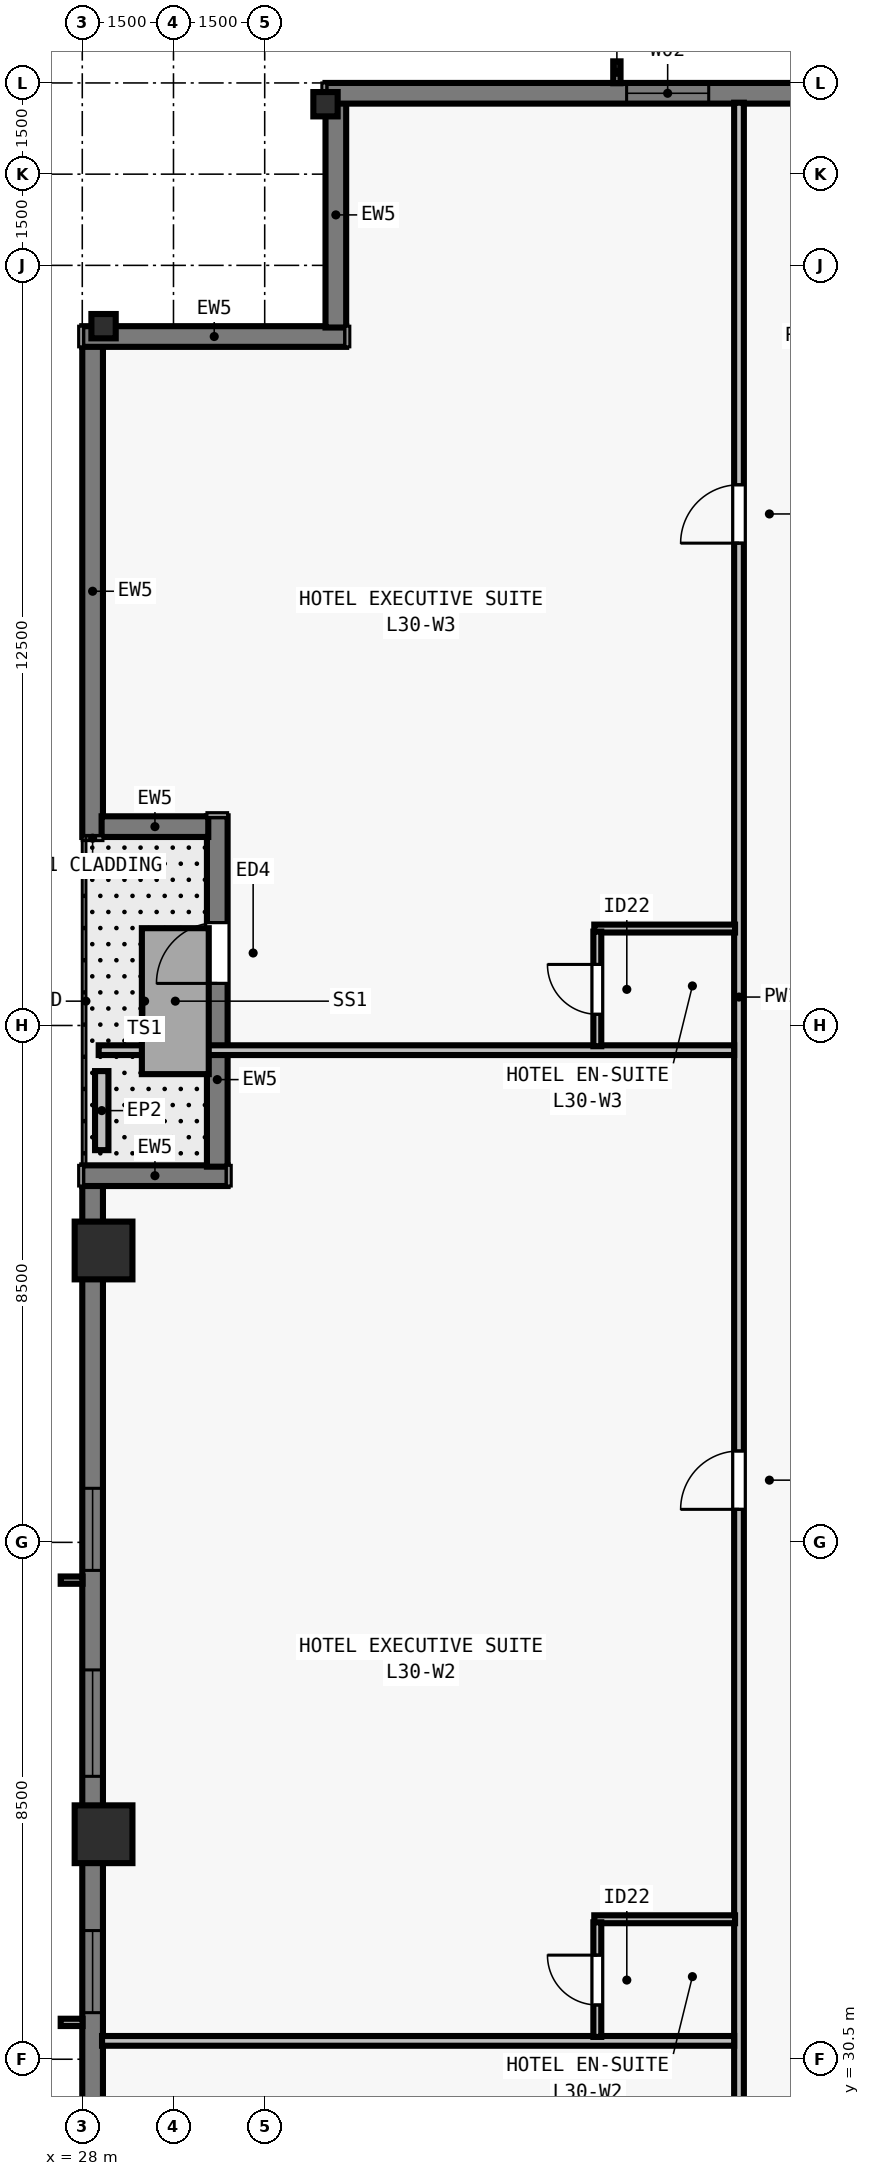
"""IFC4 building model, lengths in metres.
Left out: names, types, materials, properties, quantities, classifications, styles, units other than length and angle.
Written with IfcOpenShell. Run it as: python <this file> out.ifc"""

import sys

from ifc_helpers import new_model, si_unit, direction, frame, frame_2d, origin, origin_2d, place, context, subcontext, project, spatial, rectangle, i_section, extrude, element, fill, save


model = new_model("IFC4")
c1 = context("Model", 3, precision=1e-05, world=origin(), true_north=direction((0.0, 1.0)))
c2 = subcontext(c1, "Body", "Model", "MODEL_VIEW")
j1 = project(units=[si_unit("LENGTHUNIT", "METRE"), si_unit("PLANEANGLEUNIT", "RADIAN")], contexts=[c1])
p1 = place(None, origin())
s1 = spatial("IfcSite", under=j1, at=p1, CompositionType="ELEMENT")
p2 = place(p1, origin())
s2 = spatial("IfcBuilding", under=s1, at=p2, CompositionType="ELEMENT")
p3 = place(p2, frame((0.0, 0.0, 113.0)))
s3 = spatial("IfcBuildingStorey", under=s2, at=p3, CompositionType="ELEMENT", Elevation=113.0)
for number, where, z_axis, x_axis in (
    (1, (32.0, 62.65, 0.0), (0.0, 0.0, 1.0), (1.0, 0.0, 0.0)),
    (2, (28.35, 59.0, 0.0), (0.0, 0.0, 1.0), (0.0, 1.0, 0.0)),
):
    element("IfcColumn", number, at=place(p3, frame(where, z_axis=z_axis, x_axis=x_axis)), inside=s3, PredefinedType="COLUMN", context=c2, shape_type="SweptSolid", body=[
        extrude(i_section(OverallWidth=0.4, OverallDepth=0.4, WebThickness=0.022, FlangeThickness=0.036, at=origin_2d()), origin(), (0.0, 0.0, 1.0), 3.5),
    ])
for number, where, z_axis, x_axis in (
    (3, (28.35, 43.8, 0.0), (0.0, 0.0, 1.0), (0.0, 1.0, 0.0)),
    (4, (28.35, 34.2, 0.0), (0.0, 0.0, 1.0), (0.0, 1.0, 0.0)),
):
    element("IfcColumn", number, at=place(p3, frame(where, z_axis=z_axis, x_axis=x_axis)), inside=s3, PredefinedType="COLUMN", context=c2, shape_type="SweptSolid", body=[
        extrude(rectangle(XDim=0.95, YDim=0.95, at=origin_2d()), origin(), (0.0, 0.0, 1.0), 3.5),
    ])
p4 = place(p3, frame((28.17, 50.6, 0.0), z_axis=(0.0, 0.0, 1.0), x_axis=(0.0, 1.0, 0.0)))
e5 = element("IfcWall", 5, at=p4, inside=s3, PredefinedType="SOLIDWALL", context=c2, shape_type="SweptSolid", body=[
    extrude(rectangle(XDim=8.082, YDim=0.34, at=frame_2d((4.041, 0.0))), origin(), (0.0, 0.0, 1.0), 3.28),
])
p5 = place(p3, frame((28.0, 58.83, 0.0), z_axis=(0.0, 0.0, 1.0), x_axis=(1.0, 0.0, 0.0)))
e6 = element("IfcWall", 6, at=p5, inside=s3, PredefinedType="SOLIDWALL", context=c2, shape_type="SweptSolid", body=[
    extrude(rectangle(XDim=4.34, YDim=0.34, at=frame_2d((2.17, 0.0))), origin(), (0.0, 0.0, 1.0), 3.28),
])
p6 = place(p3, frame((32.17, 58.978, 0.0), z_axis=(0.0, 0.0, 1.0), x_axis=(0.0, 1.0, 0.0)))
e7 = element("IfcWall", 7, at=p6, inside=s3, PredefinedType="SOLIDWALL", context=c2, shape_type="SweptSolid", body=[
    extrude(rectangle(XDim=3.704, YDim=0.34, at=frame_2d((1.852, 0.0))), origin(), (0.0, 0.0, 1.0), 3.28),
])
p7 = place(p3, frame((32.0, 62.83, 0.0), z_axis=(0.0, 0.0, 1.0), x_axis=(1.0, 0.0, 0.0)))
e8 = element("IfcWall", 8, at=p7, inside=s3, PredefinedType="SOLIDWALL", context=c2, shape_type="SweptSolid", body=[
    extrude(rectangle(XDim=39.682, YDim=0.34, at=frame_2d((19.841, 0.0))), origin(), (0.0, 0.0, 1.0), 3.28),
])
p8 = place(p7, frame((4.952, 0.0, 0.8)))
e9 = element("IfcOpeningElement", 9, at=p8, cuts=e8, PredefinedType="OPENING", context=c2, shape_type="SweptSolid", body=[
    extrude(rectangle(XDim=1.35, YDim=1.66, at=frame_2d((0.675, 0.83))), frame((0.0, 0.18, 0.0), z_axis=(0.0, -1.0, 0.0), x_axis=(1.0, 0.0, 0.0)), (0.0, 0.0, 1.0), 0.36),
])
p9 = place(p7, frame((9.555, 0.0, 0.8)))
e10 = element("IfcOpeningElement", 10, at=p9, cuts=e8, PredefinedType="OPENING", context=c2, shape_type="SweptSolid", body=[
    extrude(rectangle(XDim=1.75, YDim=1.66, at=frame_2d((0.875, 0.83))), frame((0.0, 0.18, 0.0), z_axis=(0.0, -1.0, 0.0), x_axis=(1.0, 0.0, 0.0)), (0.0, 0.0, 1.0), 0.36),
])
p10 = place(p7, frame((12.059, 0.0, 0.8)))
e11 = element("IfcOpeningElement", 11, at=p10, cuts=e8, PredefinedType="OPENING", context=c2, shape_type="SweptSolid", body=[
    extrude(rectangle(XDim=1.35, YDim=1.66, at=frame_2d((0.675, 0.83))), frame((0.0, 0.18, 0.0), z_axis=(0.0, -1.0, 0.0), x_axis=(1.0, 0.0, 0.0)), (0.0, 0.0, 1.0), 0.36),
])
p11 = place(p7, frame((19.166, 0.0, 0.8)))
e12 = element("IfcOpeningElement", 12, at=p11, cuts=e8, PredefinedType="OPENING", context=c2, shape_type="SweptSolid", body=[
    extrude(rectangle(XDim=1.35, YDim=1.66, at=frame_2d((0.675, 0.83))), frame((0.0, 0.18, 0.0), z_axis=(0.0, -1.0, 0.0), x_axis=(1.0, 0.0, 0.0)), (0.0, 0.0, 1.0), 0.36),
])
p12 = place(p7, frame((21.27, 0.0, 0.8)))
e13 = element("IfcOpeningElement", 13, at=p12, cuts=e8, PredefinedType="OPENING", context=c2, shape_type="SweptSolid", body=[
    extrude(rectangle(XDim=1.75, YDim=1.66, at=frame_2d((0.875, 0.83))), frame((0.0, 0.18, 0.0), z_axis=(0.0, -1.0, 0.0), x_axis=(1.0, 0.0, 0.0)), (0.0, 0.0, 1.0), 0.36),
])
p13 = place(p7, frame((26.273, 0.0, 0.8)))
e14 = element("IfcOpeningElement", 14, at=p13, cuts=e8, PredefinedType="OPENING", context=c2, shape_type="SweptSolid", body=[
    extrude(rectangle(XDim=1.35, YDim=1.66, at=frame_2d((0.675, 0.83))), frame((0.0, 0.18, 0.0), z_axis=(0.0, -1.0, 0.0), x_axis=(1.0, 0.0, 0.0)), (0.0, 0.0, 1.0), 0.36),
])
p14 = place(p7, frame((28.777, 0.0, 0.8)))
e15 = element("IfcOpeningElement", 15, at=p14, cuts=e8, PredefinedType="OPENING", context=c2, shape_type="SweptSolid", body=[
    extrude(rectangle(XDim=1.75, YDim=1.66, at=frame_2d((0.875, 0.83))), frame((0.0, 0.18, 0.0), z_axis=(0.0, -1.0, 0.0), x_axis=(1.0, 0.0, 0.0)), (0.0, 0.0, 1.0), 0.36),
])
p15 = place(p7, frame((33.83, 0.0, 0.8)))
e16 = element("IfcOpeningElement", 16, at=p15, cuts=e8, PredefinedType="OPENING", context=c2, shape_type="SweptSolid", body=[
    extrude(rectangle(XDim=1.35, YDim=1.66, at=frame_2d((0.675, 0.83))), frame((0.0, 0.18, 0.0), z_axis=(0.0, -1.0, 0.0), x_axis=(1.0, 0.0, 0.0)), (0.0, 0.0, 1.0), 0.36),
])
p16 = place(p3, frame((28.17, 19.0, 0.0), z_axis=(0.0, 0.0, 1.0), x_axis=(0.0, 1.0, 0.0)))
e17 = element("IfcWall", 17, at=p16, inside=s3, PredefinedType="SOLIDWALL", context=c2, shape_type="SweptSolid", body=[
    extrude(rectangle(XDim=25.882, YDim=0.34, at=frame_2d((12.941, 0.0))), origin(), (0.0, 0.0, 1.0), 3.28),
])
p17 = place(p16, frame((4.993, 0.0, 0.8)))
e18 = element("IfcOpeningElement", 18, at=p17, cuts=e17, PredefinedType="OPENING", context=c2, shape_type="SweptSolid", body=[
    extrude(rectangle(XDim=1.35, YDim=1.66, at=frame_2d((0.675, 0.83))), frame((0.0, 0.18, 0.0), z_axis=(0.0, -1.0, 0.0), x_axis=(1.0, 0.0, 0.0)), (0.0, 0.0, 1.0), 0.36),
])
p18 = place(p16, frame((8.43, 0.0, 0.8)))
e19 = element("IfcOpeningElement", 19, at=p18, cuts=e17, PredefinedType="OPENING", context=c2, shape_type="SweptSolid", body=[
    extrude(rectangle(XDim=1.75, YDim=1.66, at=frame_2d((0.875, 0.83))), frame((0.0, 0.18, 0.0), z_axis=(0.0, -1.0, 0.0), x_axis=(1.0, 0.0, 0.0)), (0.0, 0.0, 1.0), 0.36),
])
p19 = place(p16, frame((12.266, 0.0, 0.8)))
e20 = element("IfcOpeningElement", 20, at=p19, cuts=e17, PredefinedType="OPENING", context=c2, shape_type="SweptSolid", body=[
    extrude(rectangle(XDim=1.35, YDim=1.66, at=frame_2d((0.675, 0.83))), frame((0.0, 0.18, 0.0), z_axis=(0.0, -1.0, 0.0), x_axis=(1.0, 0.0, 0.0)), (0.0, 0.0, 1.0), 0.36),
])
p20 = place(p16, frame((16.152, 0.0, 0.8)))
e21 = element("IfcOpeningElement", 21, at=p20, cuts=e17, PredefinedType="OPENING", context=c2, shape_type="SweptSolid", body=[
    extrude(rectangle(XDim=1.75, YDim=1.66, at=frame_2d((0.875, 0.83))), frame((0.0, 0.18, 0.0), z_axis=(0.0, -1.0, 0.0), x_axis=(1.0, 0.0, 0.0)), (0.0, 0.0, 1.0), 0.36),
])
p21 = place(p16, frame((19.539, 0.0, 0.8)))
e22 = element("IfcOpeningElement", 22, at=p21, cuts=e17, PredefinedType="OPENING", context=c2, shape_type="SweptSolid", body=[
    extrude(rectangle(XDim=1.35, YDim=1.66, at=frame_2d((0.675, 0.83))), frame((0.0, 0.18, 0.0), z_axis=(0.0, -1.0, 0.0), x_axis=(1.0, 0.0, 0.0)), (0.0, 0.0, 1.0), 0.36),
])
p22 = place(p3, frame((28.0, 45.03, 0.0), z_axis=(0.0, 0.0, 1.0), x_axis=(1.0, 0.0, 0.0)))
e23 = element("IfcWall", 23, at=p22, inside=s3, PredefinedType="SOLIDWALL", context=c2, shape_type="SweptSolid", body=[
    extrude(rectangle(XDim=2.39, YDim=0.34, at=frame_2d((1.195, 0.0))), origin(), (0.0, 0.0, 1.0), 3.28),
])
p23 = place(p3, frame((30.22, 45.178, 0.0), z_axis=(0.0, 0.0, 1.0), x_axis=(0.0, 1.0, 0.0)))
e24 = element("IfcWall", 24, at=p23, inside=s3, PredefinedType="SOLIDWALL", context=c2, shape_type="SweptSolid", body=[
    extrude(rectangle(XDim=5.762, YDim=0.34, at=frame_2d((2.881, 0.0))), origin(), (0.0, 0.0, 1.0), 3.28),
])
p24 = place(p23, frame((3.014, 0.0, 0.0)))
e25 = element("IfcOpeningElement", 25, at=p24, cuts=e24, PredefinedType="OPENING", context=c2, shape_type="SweptSolid", body=[
    extrude(rectangle(XDim=1.0, YDim=2.15, at=frame_2d((0.5, 1.075))), frame((0.0, 0.18, 0.0), z_axis=(0.0, -1.0, 0.0), x_axis=(1.0, 0.0, 0.0)), (0.0, 0.0, 1.0), 0.36),
])
p25 = place(p3, frame((30.072, 50.77, 0.0), z_axis=(0.0, 0.0, 1.0), x_axis=(-1.0, 0.0, 0.0)))
e26 = element("IfcWall", 26, at=p25, inside=s3, PredefinedType="SOLIDWALL", context=c2, shape_type="SweptSolid", body=[
    extrude(rectangle(XDim=1.754, YDim=0.34, at=frame_2d((0.877, 0.0))), origin(), (0.0, 0.0, 1.0), 3.28),
])
p26 = place(p3, frame((28.32, 45.45, 0.0), z_axis=(0.0, 0.0, 1.0), x_axis=(0.0, 1.0, 0.0)))
e27 = element("IfcWall", 27, at=p26, inside=s3, PredefinedType="PARAPET", context=c2, shape_type="SweptSolid", body=[
    extrude(rectangle(XDim=1.3, YDim=0.22, at=frame_2d((0.65, 0.0))), origin(), (0.0, 0.0, 1.0), 0.55),
])
p27 = place(p3, frame((38.8, 15.325, 0.0), z_axis=(0.0, 0.0, 1.0), x_axis=(0.0, 1.0, 0.0)))
e28 = element("IfcWall", 28, at=p27, inside=s3, PredefinedType="PARTITIONING", context=c2, shape_type="SweptSolid", body=[
    extrude(rectangle(XDim=47.35, YDim=0.16, at=frame_2d((23.675, 0.0))), origin(), (0.0, 0.0, 1.0), 2.555),
])
p28 = place(p27, frame((8.606, 0.0, 0.0)))
e29 = element("IfcOpeningElement", 29, at=p28, cuts=e28, PredefinedType="OPENING", context=c2, shape_type="SweptSolid", body=[
    extrude(rectangle(XDim=0.96, YDim=2.15, at=frame_2d((0.48, 1.075))), frame((0.0, 0.09, 0.0), z_axis=(0.0, -1.0, 0.0), x_axis=(1.0, 0.0, 0.0)), (0.0, 0.0, 1.0), 0.18),
])
p29 = place(p27, frame((24.218, 0.0, 0.0)))
e30 = element("IfcOpeningElement", 30, at=p29, cuts=e28, PredefinedType="OPENING", context=c2, shape_type="SweptSolid", body=[
    extrude(rectangle(XDim=0.96, YDim=2.15, at=frame_2d((0.48, 1.075))), frame((0.0, 0.09, 0.0), z_axis=(0.0, -1.0, 0.0), x_axis=(1.0, 0.0, 0.0)), (0.0, 0.0, 1.0), 0.18),
])
p30 = place(p27, frame((40.107, 0.0, 0.0)))
e31 = element("IfcOpeningElement", 31, at=p30, cuts=e28, PredefinedType="OPENING", context=c2, shape_type="SweptSolid", body=[
    extrude(rectangle(XDim=0.96, YDim=2.15, at=frame_2d((0.48, 1.075))), frame((0.0, 0.09, 0.0), z_axis=(0.0, -1.0, 0.0), x_axis=(1.0, 0.0, 0.0)), (0.0, 0.0, 1.0), 0.18),
])
p31 = place(p3, frame((28.325, 30.802, 0.0), z_axis=(0.0, 0.0, 1.0), x_axis=(1.0, 0.0, 0.0)))
e32 = element("IfcWall", 32, at=p31, inside=s3, PredefinedType="PARTITIONING", context=c2, shape_type="SweptSolid", body=[
    extrude(rectangle(XDim=10.395, YDim=0.16, at=frame_2d((5.198, 0.0))), origin(), (0.0, 0.0, 1.0), 3.28),
])
p32 = place(p3, frame((36.42, 32.802, 0.0), z_axis=(0.0, 0.0, 1.0), x_axis=(1.0, 0.0, 0.0)))
e33 = element("IfcWall", 33, at=p32, inside=s3, PredefinedType="PLUMBINGWALL", context=c2, shape_type="SweptSolid", body=[
    extrude(rectangle(XDim=2.315, YDim=0.13, at=frame_2d((1.158, 0.0))), origin(), (0.0, 0.0, 1.0), 3.28),
])
p33 = place(p3, frame((36.47, 30.867, 0.0), z_axis=(0.0, 0.0, 1.0), x_axis=(0.0, 1.0, 0.0)))
e34 = element("IfcWall", 34, at=p33, inside=s3, PredefinedType="PLUMBINGWALL", context=c2, shape_type="SweptSolid", body=[
    extrude(rectangle(XDim=1.885, YDim=0.13, at=frame_2d((0.942, 0.0))), origin(), (0.0, 0.0, 1.0), 3.28),
])
p34 = place(p33, frame((0.525, 0.0, 0.0)))
e35 = element("IfcOpeningElement", 35, at=p34, cuts=e34, PredefinedType="OPENING", context=c2, shape_type="SweptSolid", body=[
    extrude(rectangle(XDim=0.82, YDim=2.1, at=frame_2d((0.41, 1.05))), frame((0.0, 0.075, 0.0), z_axis=(0.0, -1.0, 0.0), x_axis=(1.0, 0.0, 0.0)), (0.0, 0.0, 1.0), 0.15),
])
p35 = place(p3, frame((28.27, 47.094, 0.0), z_axis=(0.0, 0.0, 1.0), x_axis=(1.0, 0.0, 0.0)))
e36 = element("IfcWall", 36, at=p35, inside=s3, PredefinedType="PARTITIONING", context=c2, shape_type="SweptSolid", body=[
    extrude(rectangle(XDim=10.45, YDim=0.16, at=frame_2d((5.225, 0.0))), origin(), (0.0, 0.0, 1.0), 3.28),
])
p36 = place(p3, frame((36.42, 49.094, 0.0), z_axis=(0.0, 0.0, 1.0), x_axis=(1.0, 0.0, 0.0)))
e37 = element("IfcWall", 37, at=p36, inside=s3, PredefinedType="PLUMBINGWALL", context=c2, shape_type="SweptSolid", body=[
    extrude(rectangle(XDim=2.315, YDim=0.13, at=frame_2d((1.158, 0.0))), origin(), (0.0, 0.0, 1.0), 3.28),
])
p37 = place(p3, frame((36.47, 47.159, 0.0), z_axis=(0.0, 0.0, 1.0), x_axis=(0.0, 1.0, 0.0)))
e38 = element("IfcWall", 38, at=p37, inside=s3, PredefinedType="PLUMBINGWALL", context=c2, shape_type="SweptSolid", body=[
    extrude(rectangle(XDim=1.885, YDim=0.13, at=frame_2d((0.942, 0.0))), origin(), (0.0, 0.0, 1.0), 3.28),
])
p38 = place(p37, frame((0.525, 0.0, 0.0)))
e39 = element("IfcOpeningElement", 39, at=p38, cuts=e38, PredefinedType="OPENING", context=c2, shape_type="SweptSolid", body=[
    extrude(rectangle(XDim=0.82, YDim=2.1, at=frame_2d((0.41, 1.05))), frame((0.0, 0.075, 0.0), z_axis=(0.0, -1.0, 0.0), x_axis=(1.0, 0.0, 0.0)), (0.0, 0.0, 1.0), 0.15),
])
p39 = place(p8, origin())
e40 = element("IfcWindow", 40, at=p39, inside=s3, PartitioningType="SINGLE_PANEL", PredefinedType="WINDOW", context=c2, shape_type="SweptSolid", body=[
    extrude(rectangle(XDim=1.35, YDim=1.66, at=frame_2d((0.675, 0.83))), frame((0.0, -0.05, 0.0), z_axis=(0.0, -1.0, 0.0), x_axis=(1.0, 0.0, 0.0)), (0.0, 0.0, 1.0), 0.06),
])
fill(e9, e40)
p40 = place(p19, origin())
e41 = element("IfcWindow", 41, at=p40, inside=s3, PartitioningType="SINGLE_PANEL", PredefinedType="WINDOW", context=c2, shape_type="SweptSolid", body=[
    extrude(rectangle(XDim=1.35, YDim=1.66, at=frame_2d((0.675, 0.83))), frame((0.0, -0.05, 0.0), z_axis=(0.0, -1.0, 0.0), x_axis=(1.0, 0.0, 0.0)), (0.0, 0.0, 1.0), 0.06),
])
fill(e20, e41)
p41 = place(p20, origin())
e42 = element("IfcWindow", 42, at=p41, inside=s3, PartitioningType="SINGLE_PANEL", PredefinedType="WINDOW", context=c2, shape_type="SweptSolid", body=[
    extrude(rectangle(XDim=1.75, YDim=1.66, at=frame_2d((0.875, 0.83))), frame((0.0, -0.05, 0.0), z_axis=(0.0, -1.0, 0.0), x_axis=(1.0, 0.0, 0.0)), (0.0, 0.0, 1.0), 0.06),
])
fill(e21, e42)
p42 = place(p21, origin())
e43 = element("IfcWindow", 43, at=p42, inside=s3, PartitioningType="SINGLE_PANEL", PredefinedType="WINDOW", context=c2, shape_type="SweptSolid", body=[
    extrude(rectangle(XDim=1.35, YDim=1.66, at=frame_2d((0.675, 0.83))), frame((0.0, -0.05, 0.0), z_axis=(0.0, -1.0, 0.0), x_axis=(1.0, 0.0, 0.0)), (0.0, 0.0, 1.0), 0.06),
])
fill(e22, e43)
p43 = place(p24, origin())
e44 = element("IfcDoor", 44, at=p43, inside=s3, OperationType="SINGLE_SWING_LEFT", PredefinedType="DOOR", context=c2, shape_type="SweptSolid", body=[
    extrude(rectangle(XDim=1.0, YDim=2.15, at=frame_2d((0.5, 1.075))), frame((0.0, 0.025, 0.0), z_axis=(0.0, -1.0, 0.0), x_axis=(1.0, 0.0, 0.0)), (0.0, 0.0, 1.0), 0.05),
])
fill(e25, e44)
p44 = place(p34, origin())
e45 = element("IfcDoor", 45, at=p44, inside=s3, OperationType="SINGLE_SWING_RIGHT", PredefinedType="DOOR", context=c2, shape_type="SweptSolid", body=[
    extrude(rectangle(XDim=0.82, YDim=2.1, at=frame_2d((0.41, 1.05))), frame((0.0, 0.025, 0.0), z_axis=(0.0, -1.0, 0.0), x_axis=(1.0, 0.0, 0.0)), (0.0, 0.0, 1.0), 0.05),
])
fill(e35, e45)
p45 = place(p29, origin())
e46 = element("IfcDoor", 46, at=p45, inside=s3, OperationType="SINGLE_SWING_LEFT", PredefinedType="DOOR", context=c2, shape_type="SweptSolid", body=[
    extrude(rectangle(XDim=0.96, YDim=2.15, at=frame_2d((0.48, 1.075))), frame((0.0, 0.025, 0.0), z_axis=(0.0, -1.0, 0.0), x_axis=(1.0, 0.0, 0.0)), (0.0, 0.0, 1.0), 0.05),
])
fill(e30, e46)
p46 = place(p38, origin())
e47 = element("IfcDoor", 47, at=p46, inside=s3, OperationType="SINGLE_SWING_RIGHT", PredefinedType="DOOR", context=c2, shape_type="SweptSolid", body=[
    extrude(rectangle(XDim=0.82, YDim=2.1, at=frame_2d((0.41, 1.05))), frame((0.0, 0.025, 0.0), z_axis=(0.0, -1.0, 0.0), x_axis=(1.0, 0.0, 0.0)), (0.0, 0.0, 1.0), 0.05),
])
fill(e39, e47)
p47 = place(p30, origin())
e48 = element("IfcDoor", 48, at=p47, inside=s3, OperationType="SINGLE_SWING_LEFT", PredefinedType="DOOR", context=c2, shape_type="SweptSolid", body=[
    extrude(rectangle(XDim=0.96, YDim=2.15, at=frame_2d((0.48, 1.075))), frame((0.0, 0.025, 0.0), z_axis=(0.0, -1.0, 0.0), x_axis=(1.0, 0.0, 0.0)), (0.0, 0.0, 1.0), 0.05),
])
fill(e31, e48)
save(model, sys.argv[1])
